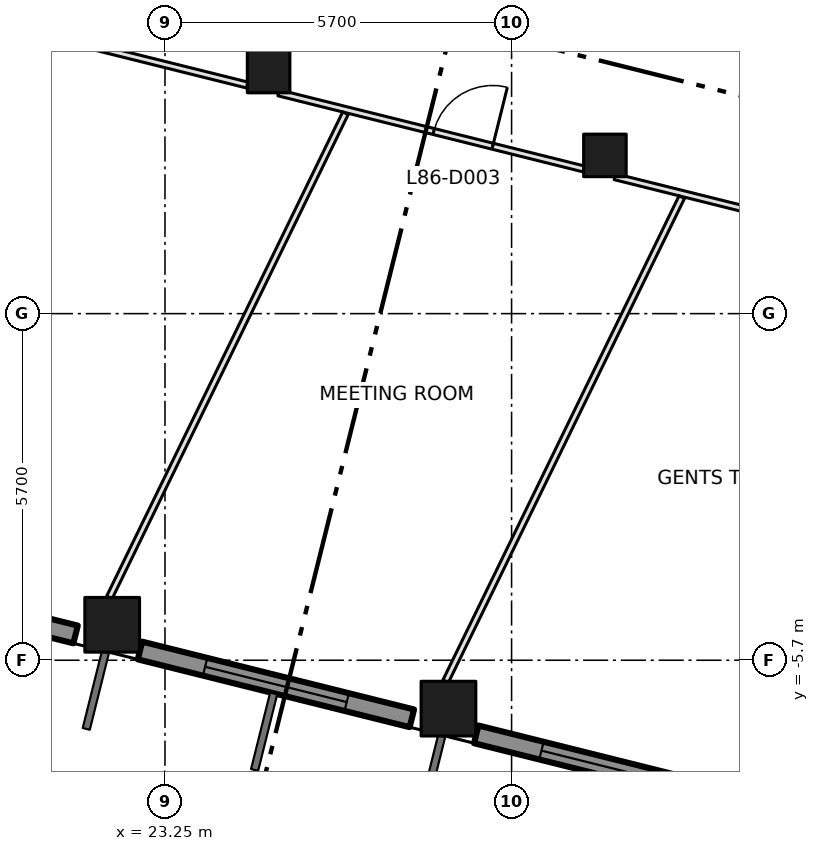
"""IFC4 building model, lengths in metres.
Left out: names, types, materials, properties, quantities, classifications, styles, units other than length and angle.
Written with IfcOpenShell. Run it as: python <this file> out.ifc"""

import sys

from ifc_helpers import new_model, si_unit, direction, frame, frame_2d, origin, origin_2d, place, context, subcontext, project, spatial, rectangle, extrude, element, fill, save


model = new_model("IFC4")
c1 = context("Model", 3, precision=1e-05, world=origin(), true_north=direction((0.0, 1.0)))
c2 = subcontext(c1, "Body", "Model", "MODEL_VIEW")
j1 = project(units=[si_unit("LENGTHUNIT", "METRE"), si_unit("PLANEANGLEUNIT", "RADIAN")], contexts=[c1])
p1 = place(None, origin())
s1 = spatial("IfcSite", under=j1, at=p1, CompositionType="ELEMENT")
p2 = place(p1, origin())
s2 = spatial("IfcBuilding", under=s1, at=p2, CompositionType="ELEMENT")
p3 = place(p2, frame((0.0, 0.0, 375.0)))
s3 = spatial("IfcBuildingStorey", under=s2, at=p3, CompositionType="ELEMENT", Elevation=375.0)
for number, where, z_axis, x_axis in (
    (1, (22.382, -5.117, 0.0), (0.0, 0.0, 1.0), (1.0, 0.0, 0.0)),
    (2, (27.912, -6.496, 0.0), (0.0, 0.0, 1.0), (1.0, 0.0, 0.0)),
):
    element("IfcColumn", number, at=place(p3, frame(where, z_axis=z_axis, x_axis=x_axis)), inside=s3, PredefinedType="COLUMN", context=c2, shape_type="SweptSolid", body=[
        extrude(rectangle(XDim=0.9, YDim=0.9, at=origin_2d()), origin(), (0.0, 0.0, 1.0), 4.2),
    ])
for number, where, z_axis, x_axis in (
    (3, (24.954, 3.981, 0.0), (0.0, 0.0, 1.0), (1.0, 0.0, 0.0)),
    (4, (30.485, 2.602, 0.0), (0.0, 0.0, 1.0), (1.0, 0.0, 0.0)),
):
    element("IfcColumn", number, at=place(p3, frame(where, z_axis=z_axis, x_axis=x_axis)), inside=s3, PredefinedType="COLUMN", context=c2, shape_type="SweptSolid", body=[
        extrude(rectangle(XDim=0.7, YDim=0.7, at=origin_2d()), origin(), (0.0, 0.0, 1.0), 4.2),
    ])
p4 = place(p3, frame((17.308, -4.161, 0.0), z_axis=(0.0, 0.0, 1.0), x_axis=(0.970294992984, -0.241924836652, 0.0)))
e5 = element("IfcWall", 5, at=p4, inside=s3, PredefinedType="SOLIDWALL", context=c2, shape_type="SweptSolid", body=[
    extrude(rectangle(XDim=4.609, YDim=0.3, at=frame_2d((2.304, 0.0))), origin(), (0.0, 0.0, 1.0), 3.2),
])
p5 = place(p4, frame((1.105, 0.0, 0.8)))
e6 = element("IfcOpeningElement", 6, at=p5, cuts=e5, PredefinedType="OPENING", context=c2, shape_type="SweptSolid", body=[
    extrude(rectangle(XDim=2.4, YDim=2.1, at=frame_2d((1.2, 1.05))), frame((0.0, 0.16, 0.0), z_axis=(0.0, -1.0, 0.0), x_axis=(1.0, 0.0, 0.0)), (0.0, 0.0, 1.0), 0.32),
])
p6 = place(p3, frame((22.839, -5.54, 0.0), z_axis=(0.0, 0.0, 1.0), x_axis=(0.970282587769, -0.241974585177, 0.0)))
e7 = element("IfcWall", 7, at=p6, inside=s3, PredefinedType="SOLIDWALL", context=c2, shape_type="SweptSolid", body=[
    extrude(rectangle(XDim=4.608, YDim=0.3, at=frame_2d((2.304, 0.0))), origin(), (0.0, 0.0, 1.0), 3.2),
])
p7 = place(p6, frame((1.104, 0.0, 0.8)))
e8 = element("IfcOpeningElement", 8, at=p7, cuts=e7, PredefinedType="OPENING", context=c2, shape_type="SweptSolid", body=[
    extrude(rectangle(XDim=2.4, YDim=2.1, at=frame_2d((1.2, 1.05))), frame((0.0, 0.16, 0.0), z_axis=(0.0, -1.0, 0.0), x_axis=(1.0, 0.0, 0.0)), (0.0, 0.0, 1.0), 0.32),
])
p8 = place(p3, frame((28.369, -6.919, 0.0), z_axis=(0.0, 0.0, 1.0), x_axis=(0.970298093093, -0.241912402618, 0.0)))
e9 = element("IfcWall", 9, at=p8, inside=s3, PredefinedType="SOLIDWALL", context=c2, shape_type="SweptSolid", body=[
    extrude(rectangle(XDim=4.609, YDim=0.3, at=frame_2d((2.305, 0.0))), origin(), (0.0, 0.0, 1.0), 3.2),
])
p9 = place(p8, frame((1.105, 0.0, 0.8)))
e10 = element("IfcOpeningElement", 10, at=p9, cuts=e9, PredefinedType="OPENING", context=c2, shape_type="SweptSolid", body=[
    extrude(rectangle(XDim=2.4, YDim=2.1, at=frame_2d((1.2, 1.05))), frame((0.0, 0.16, 0.0), z_axis=(0.0, -1.0, 0.0), x_axis=(1.0, 0.0, 0.0)), (0.0, 0.0, 1.0), 0.32),
])
p10 = place(p3, frame((19.586, 5.01, 0.0), z_axis=(0.0, 0.0, 1.0), x_axis=(0.970303347181, -0.241891327769, 0.0)))
e11 = element("IfcWall", 11, at=p10, inside=s3, PredefinedType="PARTITIONING", context=c2, shape_type="SweptSolid", body=[
    extrude(rectangle(XDim=5.172, YDim=0.1, at=frame_2d((2.586, 0.0))), origin(), (0.0, 0.0, 1.0), 3.9),
])
p11 = place(p3, frame((25.118, 3.631, 0.0), z_axis=(0.0, 0.0, 1.0), x_axis=(0.970281210621, -0.241980107272, 0.0)))
e12 = element("IfcWall", 12, at=p11, inside=s3, PredefinedType="PARTITIONING", context=c2, shape_type="SweptSolid", body=[
    extrude(rectangle(XDim=5.171, YDim=0.1, at=frame_2d((2.585, 0.0))), origin(), (0.0, 0.0, 1.0), 3.9),
])
p12 = place(p11, frame((2.629, 0.0, 0.0)))
e13 = element("IfcOpeningElement", 13, at=p12, cuts=e12, PredefinedType="OPENING", context=c2, shape_type="SweptSolid", body=[
    extrude(rectangle(XDim=1.0, YDim=2.1, at=frame_2d((0.5, 1.05))), frame((0.0, 0.06, 0.0), z_axis=(0.0, -1.0, 0.0), x_axis=(1.0, 0.0, 0.0)), (0.0, 0.0, 1.0), 0.12),
])
p13 = place(p3, frame((30.649, 2.252, 0.0), z_axis=(0.0, 0.0, 1.0), x_axis=(0.970292295429, -0.241935655561, 0.0)))
e14 = element("IfcWall", 14, at=p13, inside=s3, PredefinedType="PARTITIONING", context=c2, shape_type="SweptSolid", body=[
    extrude(rectangle(XDim=5.171, YDim=0.1, at=frame_2d((2.585, 0.0))), origin(), (0.0, 0.0, 1.0), 3.9),
])
p14 = place(p13, frame((2.729, 0.0, 0.0)))
e15 = element("IfcOpeningElement", 15, at=p14, cuts=e14, PredefinedType="OPENING", context=c2, shape_type="SweptSolid", body=[
    extrude(rectangle(XDim=1.0, YDim=2.1, at=frame_2d((0.5, 1.05))), frame((0.0, 0.06, 0.0), z_axis=(0.0, -1.0, 0.0), x_axis=(1.0, 0.0, 0.0)), (0.0, 0.0, 1.0), 0.12),
])
p15 = place(p3, frame((22.336, -4.667, 0.0), z_axis=(0.0, 0.0, 1.0), x_axis=(0.438261260169, 0.89884763327, 0.0)))
e16 = element("IfcWall", 16, at=p15, inside=s3, PredefinedType="PARTITIONING", context=c2, shape_type="SweptSolid", body=[
    extrude(rectangle(XDim=8.858, YDim=0.1, at=frame_2d((4.429, 0.0))), origin(), (0.0, 0.0, 1.0), 3.9),
])
p16 = place(p3, frame((27.866, -6.046, 0.0), z_axis=(0.0, 0.0, 1.0), x_axis=(0.438350325629, 0.898804201159, 0.0)))
e17 = element("IfcWall", 17, at=p16, inside=s3, PredefinedType="PARTITIONING", context=c2, shape_type="SweptSolid", body=[
    extrude(rectangle(XDim=8.858, YDim=0.1, at=frame_2d((4.429, 0.0))), origin(), (0.0, 0.0, 1.0), 3.9),
])
p17 = place(p7, origin())
e18 = element("IfcWindow", 18, at=p17, inside=s3, PartitioningType="DOUBLE_PANEL_VERTICAL", PredefinedType="WINDOW", context=c2, shape_type="SweptSolid", body=[
    extrude(rectangle(XDim=2.4, YDim=2.1, at=frame_2d((1.2, 1.05))), frame((0.0, 0.03, 0.0), z_axis=(0.0, -1.0, 0.0), x_axis=(1.0, 0.0, 0.0)), (0.0, 0.0, 1.0), 0.06),
])
fill(e8, e18)
p18 = place(p9, origin())
e19 = element("IfcWindow", 19, at=p18, inside=s3, PartitioningType="DOUBLE_PANEL_VERTICAL", PredefinedType="WINDOW", context=c2, shape_type="SweptSolid", body=[
    extrude(rectangle(XDim=2.4, YDim=2.1, at=frame_2d((1.2, 1.05))), frame((0.0, 0.03, 0.0), z_axis=(0.0, -1.0, 0.0), x_axis=(1.0, 0.0, 0.0)), (0.0, 0.0, 1.0), 0.06),
])
fill(e10, e19)
p19 = place(p12, origin())
e20 = element("IfcDoor", 20, at=p19, inside=s3, OperationType="SINGLE_SWING_RIGHT", PredefinedType="DOOR", context=c2, shape_type="SweptSolid", body=[
    extrude(rectangle(XDim=1.0, YDim=2.1, at=frame_2d((0.5, 1.05))), frame((0.0, 0.025, 0.0), z_axis=(0.0, -1.0, 0.0), x_axis=(1.0, 0.0, 0.0)), (0.0, 0.0, 1.0), 0.05),
])
fill(e13, e20)
save(model, sys.argv[1])
